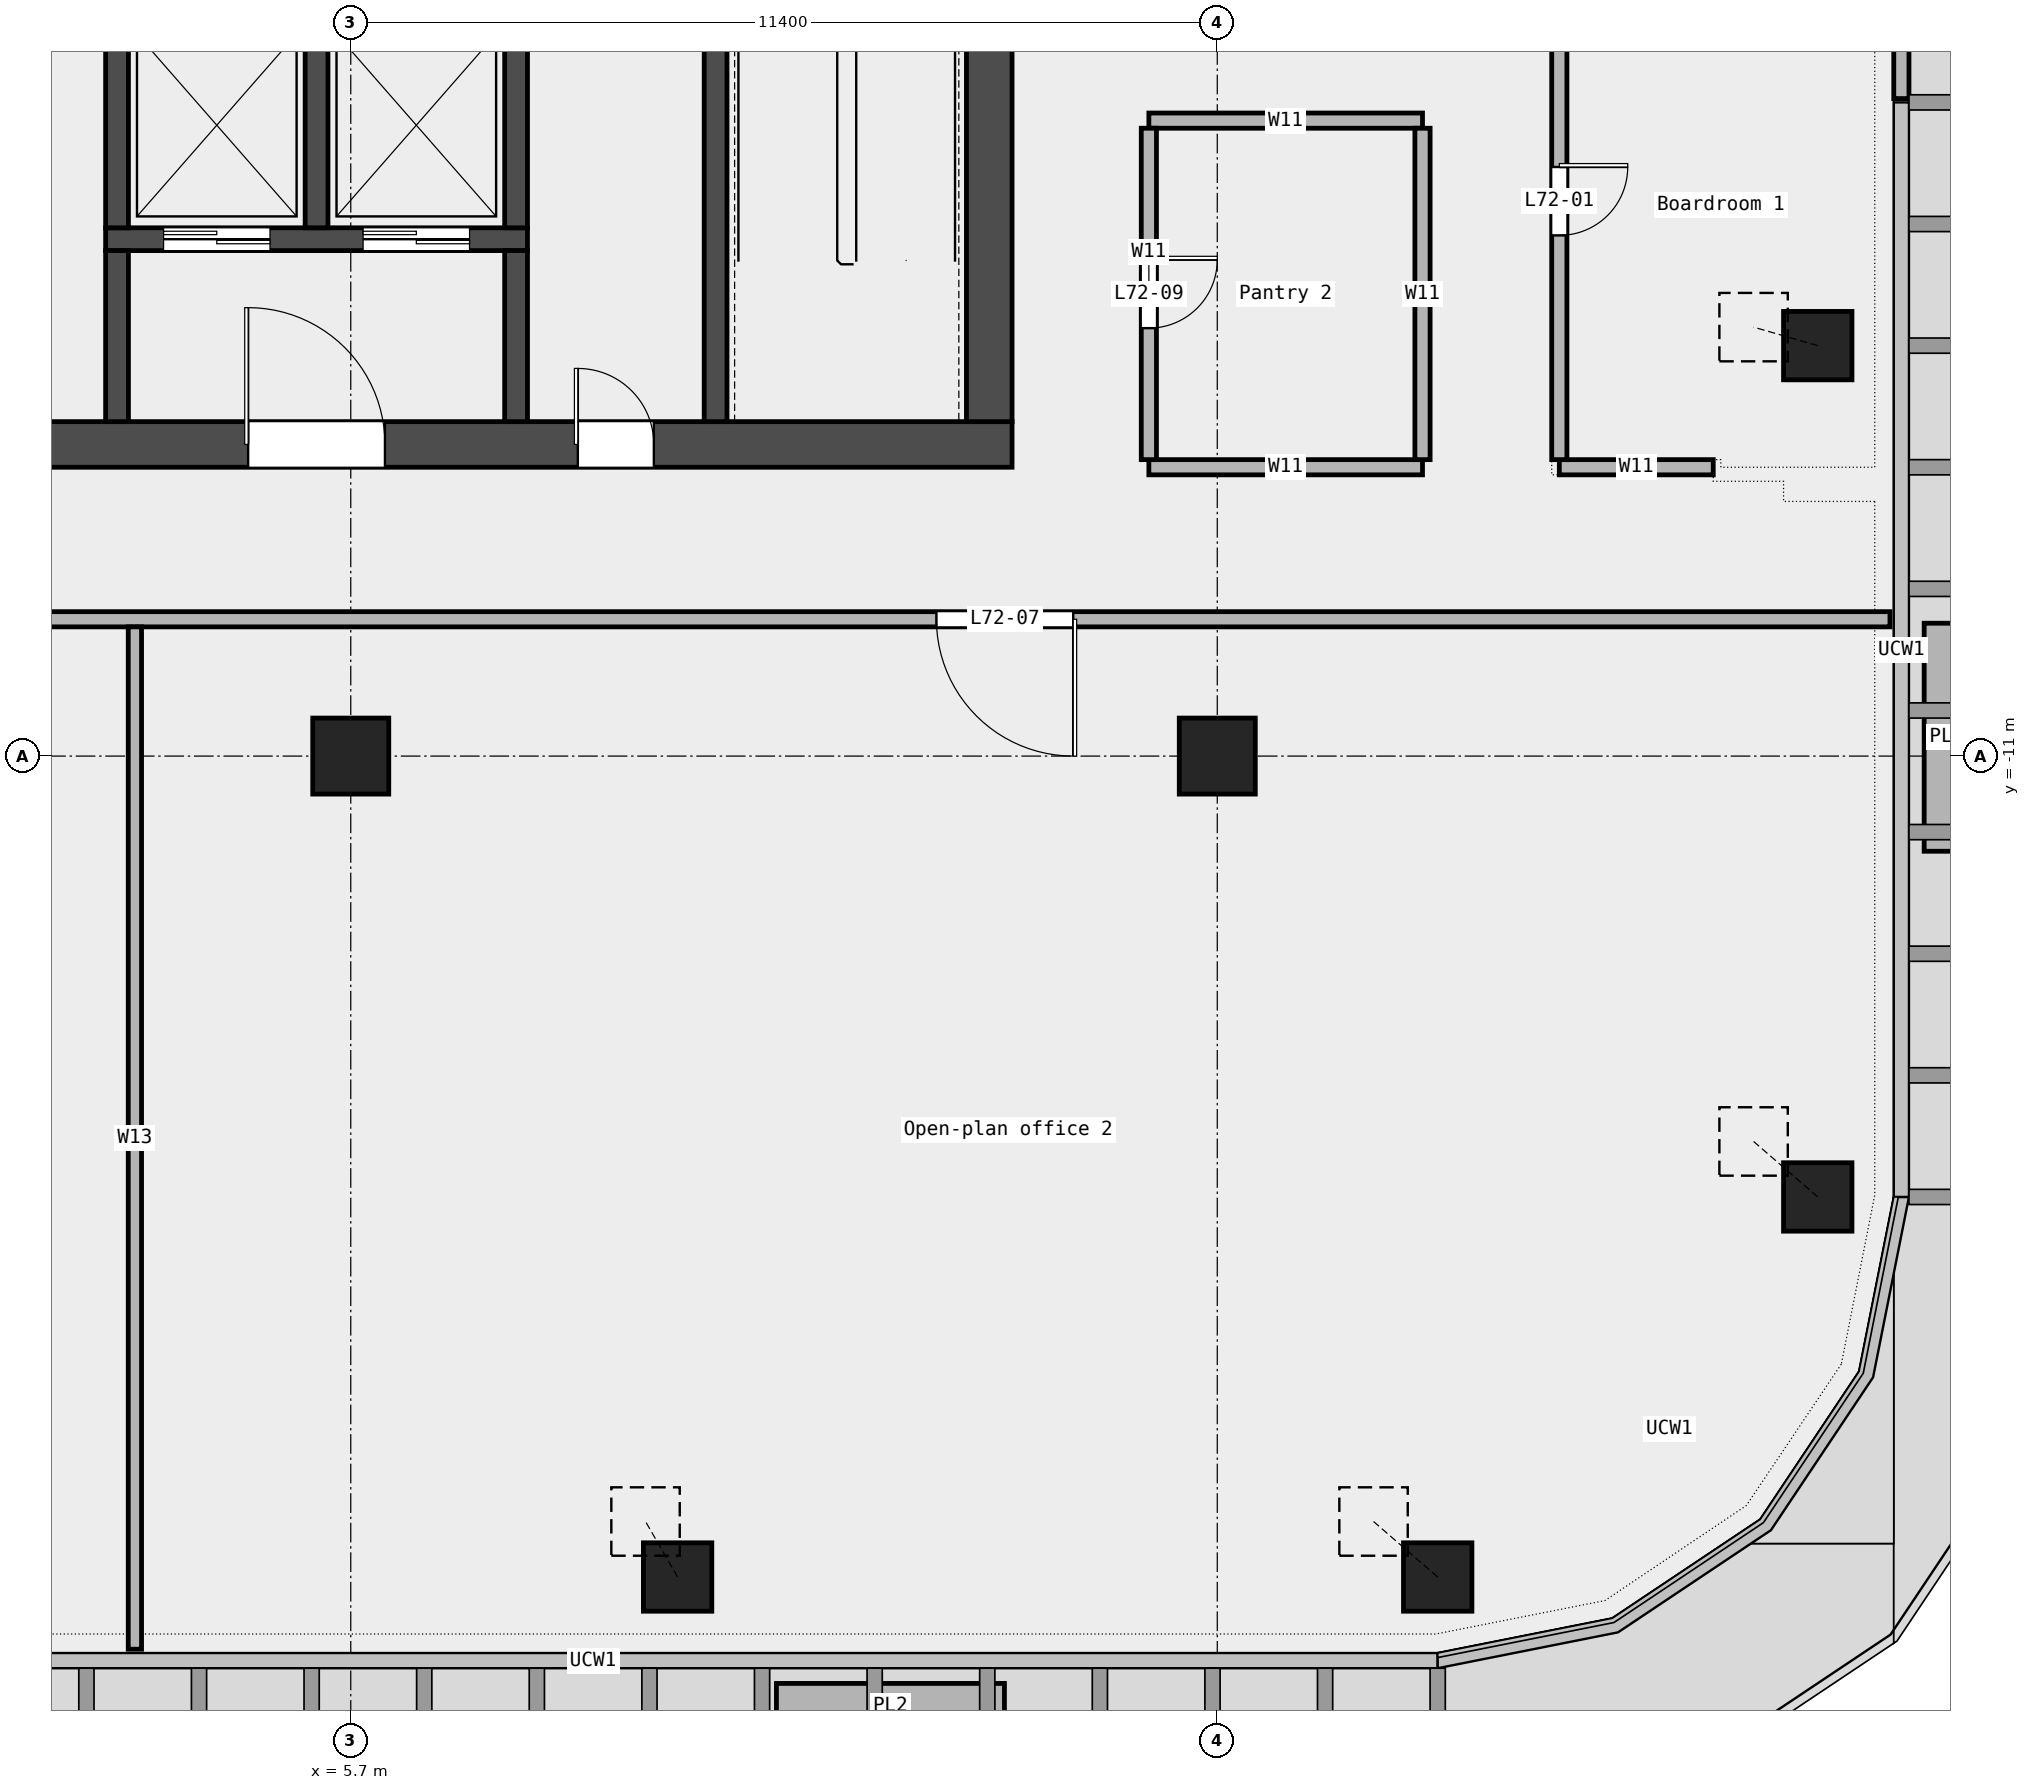
"""IFC4 building model, lengths in metres.
Left out: names, types, materials, properties, quantities, classifications, styles, units other than length and angle.
Written with IfcOpenShell. Run it as: python <this file> out.ifc"""

import sys

from ifc_helpers import new_model, si_unit, direction, frame, frame_2d, origin, origin_2d, place, context, subcontext, project, spatial, rectangle, extrude, element, fill, save


model = new_model("IFC4")
c1 = context("Model", 3, precision=1e-05, world=origin(), true_north=direction((0.0, 1.0)))
c2 = subcontext(c1, "Body", "Model", "MODEL_VIEW")
j1 = project(units=[si_unit("LENGTHUNIT", "METRE"), si_unit("PLANEANGLEUNIT", "RADIAN")], contexts=[c1])
p1 = place(None, origin())
s1 = spatial("IfcSite", under=j1, at=p1, CompositionType="ELEMENT")
p2 = place(p1, origin())
s2 = spatial("IfcBuilding", under=s1, at=p2, CompositionType="ELEMENT")
p3 = place(p2, frame((0.0, 0.0, 329.4)))
s3 = spatial("IfcBuildingStorey", under=s2, at=p3, CompositionType="ELEMENT", Elevation=329.4)
p4 = place(p3, frame((10.0, -21.8, 0.0), z_axis=(-0.112612491067, 0.194856104335, 0.974345690943), x_axis=(-0.8658093198, -0.500374081811, 0.0)))
e1 = element("IfcColumn", 1, at=p4, inside=s3, PredefinedType="COLUMN", context=c2, shape_type="SweptSolid", body=[
    extrude(rectangle(XDim=0.9, YDim=0.9, at=origin_2d()), origin(), (0.0, 0.0, 1.0), 3.746),
])
for number, where, z_axis, x_axis in (
    (2, (20.0, -21.8, 0.0), (-0.221, 0.191, 0.956), (-0.654, -0.756, 0.0)),
    (3, (25.0, -16.8, 0.0), (-0.221, 0.191, 0.956), (-0.654, -0.756, 0.0)),
):
    element("IfcColumn", number, at=place(p3, frame(where, z_axis=z_axis, x_axis=x_axis)), inside=s3, PredefinedType="COLUMN", context=c2, shape_type="SweptSolid", body=[
        extrude(rectangle(XDim=0.9, YDim=0.9, at=origin_2d()), origin(), (0.0, 0.0, 1.0), 3.817),
    ])
p5 = place(p3, frame((25.0, -5.6, 0.0), z_axis=(-0.224804338338, 0.064833649211, 0.972244623227), x_axis=(-0.277106372338, -0.960839246914, 0.0)))
e4 = element("IfcColumn", 4, at=p5, inside=s3, PredefinedType="COLUMN", context=c2, shape_type="SweptSolid", body=[
    extrude(rectangle(XDim=0.9, YDim=0.9, at=origin_2d()), origin(), (0.0, 0.0, 1.0), 3.754),
])
for number, where, z_axis, x_axis in (
    (5, (5.7, -11.0, 0.0), (0.0, 0.0, 1.0), (1.0, 0.0, 0.0)),
    (6, (17.1, -11.0, 0.0), (0.0, 0.0, 1.0), (1.0, 0.0, 0.0)),
):
    element("IfcColumn", number, at=place(p3, frame(where, z_axis=z_axis, x_axis=x_axis)), inside=s3, PredefinedType="COLUMN", context=c2, shape_type="SweptSolid", body=[
        extrude(rectangle(XDim=1.0, YDim=1.0, at=origin_2d()), origin(), (0.0, 0.0, 1.0), 3.65),
    ])
p6 = place(p3, frame((26.1, -2.35, 0.0), z_axis=(0.0, 0.0, 1.0), x_axis=(0.0, 1.0, 0.0)))
e7 = element("IfcWall", 7, at=p6, inside=s3, PredefinedType="STANDARD", context=c2, shape_type="SweptSolid", body=[
    extrude(rectangle(XDim=4.7, YDim=0.2, at=frame_2d((2.35, 0.0))), origin(), (0.0, 0.0, 1.0), 3.65),
])
p7 = place(p6, frame((2.3, 0.0, 0.0)))
e8 = element("IfcOpeningElement", 8, at=p7, cuts=e7, PredefinedType="OPENING", context=c2, shape_type="SweptSolid", body=[
    extrude(rectangle(XDim=1.8, YDim=2.4, at=frame_2d((0.9, 1.2))), frame((0.0, 0.112, 0.0), z_axis=(0.0, -1.0, 0.0), x_axis=(1.0, 0.0, 0.0)), (0.0, 0.0, 1.0), 0.224),
])
for number, where, z_axis, x_axis in (
    (9, (11.3, -23.5, 0.0), (0.0, 0.0, 1.0), (1.0, 0.0, 0.0)),
    (10, (26.7, -12.252, 0.0), (0.0, 0.0, 1.0), (0.0, 1.0, 0.0)),
):
    element("IfcWall", number, at=place(p3, frame(where, z_axis=z_axis, x_axis=x_axis)), inside=s3, PredefinedType="STANDARD", context=c2, shape_type="SweptSolid", body=[
        extrude(rectangle(XDim=3.0, YDim=0.6, at=frame_2d((1.5, 0.0))), origin(), (0.0, 0.0, 1.0), 0.7),
    ])
p8 = place(p3, frame((-25.95, -9.2, 0.0), z_axis=(0.0, 0.0, 1.0), x_axis=(1.0, 0.0, 0.0)))
e11 = element("IfcWall", 11, at=p8, inside=s3, PredefinedType="PARTITIONING", context=c2, shape_type="SweptSolid", body=[
    extrude(rectangle(XDim=51.9, YDim=0.2, at=frame_2d((25.95, 0.0))), origin(), (0.0, 0.0, 1.0), 3.65),
])
p9 = place(p8, frame((39.355, 0.0, 0.0)))
e12 = element("IfcOpeningElement", 12, at=p9, cuts=e11, PredefinedType="OPENING", context=c2, shape_type="SweptSolid", body=[
    extrude(rectangle(XDim=1.8, YDim=2.1, at=frame_2d((0.9, 1.05))), frame((0.0, 0.112, 0.0), z_axis=(0.0, -1.0, 0.0), x_axis=(1.0, 0.0, 0.0)), (0.0, 0.0, 1.0), 0.224),
])
p10 = place(p8, frame((5.173, 0.0, 0.0)))
e13 = element("IfcOpeningElement", 13, at=p10, cuts=e11, PredefinedType="OPENING", context=c2, shape_type="SweptSolid", body=[
    extrude(rectangle(XDim=1.5, YDim=2.1, at=frame_2d((0.75, 1.05))), frame((0.0, 0.112, 0.0), z_axis=(0.0, -1.0, 0.0), x_axis=(1.0, 0.0, 0.0)), (0.0, 0.0, 1.0), 0.224),
])
p11 = place(p8, frame((20.827, 0.0, 0.0)))
e14 = element("IfcOpeningElement", 14, at=p11, cuts=e11, PredefinedType="OPENING", context=c2, shape_type="SweptSolid", body=[
    extrude(rectangle(XDim=1.8, YDim=2.1, at=frame_2d((0.9, 1.05))), frame((0.0, 0.112, 0.0), z_axis=(0.0, -1.0, 0.0), x_axis=(1.0, 0.0, 0.0)), (0.0, 0.0, 1.0), 0.224),
])
p12 = place(p3, frame((16.2, -7.2, 0.0), z_axis=(0.0, 0.0, 1.0), x_axis=(1.0, 0.0, 0.0)))
e15 = element("IfcWall", 15, at=p12, inside=s3, PredefinedType="PARTITIONING", context=c2, shape_type="SweptSolid", body=[
    extrude(rectangle(XDim=3.6, YDim=0.2, at=frame_2d((1.8, 0.0))), origin(), (0.0, 0.0, 1.0), 3.65),
])
p13 = place(p3, frame((21.6, -7.2, 0.0), z_axis=(0.0, 0.0, 1.0), x_axis=(1.0, 0.0, 0.0)))
e16 = element("IfcWall", 16, at=p13, inside=s3, PredefinedType="PARTITIONING", context=c2, shape_type="SweptSolid", body=[
    extrude(rectangle(XDim=2.025, YDim=0.2, at=frame_2d((1.012, 0.0))), origin(), (0.0, 0.0, 1.0), 3.65),
])
p14 = place(p3, frame((16.2, -2.64, 0.0), z_axis=(0.0, 0.0, 1.0), x_axis=(1.0, 0.0, 0.0)))
e17 = element("IfcWall", 17, at=p14, inside=s3, PredefinedType="PARTITIONING", context=c2, shape_type="SweptSolid", body=[
    extrude(rectangle(XDim=3.6, YDim=0.2, at=frame_2d((1.8, 0.0))), origin(), (0.0, 0.0, 1.0), 3.65),
])
p15 = place(p3, frame((2.86, -22.75, 0.0), z_axis=(0.0, 0.0, 1.0), x_axis=(0.0, 1.0, 0.0)))
e18 = element("IfcWall", 18, at=p15, inside=s3, PredefinedType="PARTITIONING", context=c2, shape_type="SweptSolid", body=[
    extrude(rectangle(XDim=13.45, YDim=0.175, at=frame_2d((6.725, 0.0))), origin(), (0.0, 0.0, 1.0), 3.65),
])
p16 = place(p3, frame((16.2, -7.1, 0.0), z_axis=(0.0, 0.0, 1.0), x_axis=(0.0, 1.0, 0.0)))
e19 = element("IfcWall", 19, at=p16, inside=s3, PredefinedType="PARTITIONING", context=c2, shape_type="SweptSolid", body=[
    extrude(rectangle(XDim=4.36, YDim=0.2, at=frame_2d((2.18, 0.0))), origin(), (0.0, 0.0, 1.0), 3.65),
])
p17 = place(p16, frame((1.73, 0.0, 0.0)))
e20 = element("IfcOpeningElement", 20, at=p17, cuts=e19, PredefinedType="OPENING", context=c2, shape_type="SweptSolid", body=[
    extrude(rectangle(XDim=0.9, YDim=2.1, at=frame_2d((0.45, 1.05))), frame((0.0, 0.112, 0.0), z_axis=(0.0, -1.0, 0.0), x_axis=(1.0, 0.0, 0.0)), (0.0, 0.0, 1.0), 0.224),
])
p18 = place(p3, frame((19.8, -7.1, 0.0), z_axis=(0.0, 0.0, 1.0), x_axis=(0.0, 1.0, 0.0)))
e21 = element("IfcWall", 21, at=p18, inside=s3, PredefinedType="PARTITIONING", context=c2, shape_type="SweptSolid", body=[
    extrude(rectangle(XDim=4.36, YDim=0.2, at=frame_2d((2.18, 0.0))), origin(), (0.0, 0.0, 1.0), 3.65),
])
p19 = place(p3, frame((21.6, -7.1, 0.0), z_axis=(0.0, 0.0, 1.0), x_axis=(0.0, 1.0, 0.0)))
e22 = element("IfcWall", 22, at=p19, inside=s3, PredefinedType="PARTITIONING", context=c2, shape_type="SweptSolid", body=[
    extrude(rectangle(XDim=20.5, YDim=0.2, at=frame_2d((10.25, 0.0))), origin(), (0.0, 0.0, 1.0), 3.65),
])
p20 = place(p19, frame((2.95, 0.0, 0.0)))
e23 = element("IfcOpeningElement", 23, at=p20, cuts=e22, PredefinedType="OPENING", context=c2, shape_type="SweptSolid", body=[
    extrude(rectangle(XDim=0.9, YDim=2.1, at=frame_2d((0.45, 1.05))), frame((0.0, 0.112, 0.0), z_axis=(0.0, -1.0, 0.0), x_axis=(1.0, 0.0, 0.0)), (0.0, 0.0, 1.0), 0.224),
])
p21 = place(p19, frame((13.05, 0.0, 0.0)))
e24 = element("IfcOpeningElement", 24, at=p21, cuts=e22, PredefinedType="OPENING", context=c2, shape_type="SweptSolid", body=[
    extrude(rectangle(XDim=1.2, YDim=2.1, at=frame_2d((0.6, 1.05))), frame((0.0, 0.112, 0.0), z_axis=(0.0, -1.0, 0.0), x_axis=(1.0, 0.0, 0.0)), (0.0, 0.0, 1.0), 0.224),
])
p22 = place(p3, frame((-14.4, -6.9, 0.0), z_axis=(0.0, 0.0, 1.0), x_axis=(1.0, 0.0, 0.0)))
e25 = element("IfcWall", 25, at=p22, inside=s3, PredefinedType="SHEAR", context=c2, shape_type="SweptSolid", body=[
    extrude(rectangle(XDim=28.8, YDim=0.6, at=frame_2d((14.4, 0.0))), origin(), (0.0, 0.0, 1.0), 3.7),
])
p23 = place(p22, frame((4.712, 0.0, 0.0)))
e26 = element("IfcOpeningElement", 26, at=p23, cuts=e25, PredefinedType="OPENING", context=c2, shape_type="SweptSolid", body=[
    extrude(rectangle(XDim=1.0, YDim=2.1, at=frame_2d((0.5, 1.05))), frame((0.0, 0.312, 0.0), z_axis=(0.0, -1.0, 0.0), x_axis=(1.0, 0.0, 0.0)), (0.0, 0.0, 1.0), 0.624),
])
p24 = place(p22, frame((9.675, 0.0, 0.0)))
e27 = element("IfcOpeningElement", 27, at=p24, cuts=e25, PredefinedType="OPENING", context=c2, shape_type="SweptSolid", body=[
    extrude(rectangle(XDim=1.2, YDim=2.1, at=frame_2d((0.6, 1.05))), frame((0.0, 0.312, 0.0), z_axis=(0.0, -1.0, 0.0), x_axis=(1.0, 0.0, 0.0)), (0.0, 0.0, 1.0), 0.624),
])
p25 = place(p22, frame((15.025, 0.0, 0.0)))
e28 = element("IfcOpeningElement", 28, at=p25, cuts=e25, PredefinedType="OPENING", context=c2, shape_type="SweptSolid", body=[
    extrude(rectangle(XDim=1.0, YDim=2.1, at=frame_2d((0.5, 1.05))), frame((0.0, 0.312, 0.0), z_axis=(0.0, -1.0, 0.0), x_axis=(1.0, 0.0, 0.0)), (0.0, 0.0, 1.0), 0.624),
])
p26 = place(p22, frame((18.75, 0.0, 0.0)))
e29 = element("IfcOpeningElement", 29, at=p26, cuts=e25, PredefinedType="OPENING", context=c2, shape_type="SweptSolid", body=[
    extrude(rectangle(XDim=1.8, YDim=2.1, at=frame_2d((0.9, 1.05))), frame((0.0, 0.312, 0.0), z_axis=(0.0, -1.0, 0.0), x_axis=(1.0, 0.0, 0.0)), (0.0, 0.0, 1.0), 0.624),
])
p27 = place(p22, frame((23.087, 0.0, 0.0)))
e30 = element("IfcOpeningElement", 30, at=p27, cuts=e25, PredefinedType="OPENING", context=c2, shape_type="SweptSolid", body=[
    extrude(rectangle(XDim=1.0, YDim=2.1, at=frame_2d((0.5, 1.05))), frame((0.0, 0.312, 0.0), z_axis=(0.0, -1.0, 0.0), x_axis=(1.0, 0.0, 0.0)), (0.0, 0.0, 1.0), 0.624),
])
p28 = place(p3, frame((14.1, -6.6, 0.0), z_axis=(0.0, 0.0, 1.0), x_axis=(0.0, 1.0, 0.0)))
e31 = element("IfcWall", 31, at=p28, inside=s3, PredefinedType="SHEAR", context=c2, shape_type="SweptSolid", body=[
    extrude(rectangle(XDim=19.5, YDim=0.6, at=frame_2d((9.75, 0.0))), origin(), (0.0, 0.0, 1.0), 3.7),
])
p29 = place(p28, frame((9.3, 0.0, 0.0)))
e32 = element("IfcOpeningElement", 32, at=p29, cuts=e31, PredefinedType="OPENING", context=c2, shape_type="SweptSolid", body=[
    extrude(rectangle(XDim=1.8, YDim=2.1, at=frame_2d((0.9, 1.05))), frame((0.0, 0.312, 0.0), z_axis=(0.0, -1.0, 0.0), x_axis=(1.0, 0.0, 0.0)), (0.0, 0.0, 1.0), 0.624),
])
p30 = place(p3, frame((10.5, -6.6, 0.0), z_axis=(0.0, 0.0, 1.0), x_axis=(0.0, 1.0, 0.0)))
e33 = element("IfcWall", 33, at=p30, inside=s3, PredefinedType="SHEAR", context=c2, shape_type="SweptSolid", body=[
    extrude(rectangle(XDim=8.55, YDim=0.3, at=frame_2d((4.275, 0.0))), origin(), (0.0, 0.0, 1.0), 3.7),
])
p31 = place(p3, frame((2.475, -4.2, 0.0), z_axis=(0.0, 0.0, 1.0), x_axis=(1.0, 0.0, 0.0)))
e34 = element("IfcWall", 34, at=p31, inside=s3, PredefinedType="SOLIDWALL", context=c2, shape_type="SweptSolid", body=[
    extrude(rectangle(XDim=5.55, YDim=0.3, at=frame_2d((2.775, 0.0))), origin(), (0.0, 0.0, 1.0), 3.7),
])
p32 = place(p31, frame((0.762, 0.0, 0.0)))
e35 = element("IfcOpeningElement", 35, at=p32, cuts=e34, PredefinedType="OPENING", context=c2, shape_type="SweptSolid", body=[
    extrude(rectangle(XDim=1.4, YDim=2.1, at=frame_2d((0.7, 1.05))), frame((0.0, 0.162, 0.0), z_axis=(0.0, -1.0, 0.0), x_axis=(1.0, 0.0, 0.0)), (0.0, 0.0, 1.0), 0.324),
])
p33 = place(p31, frame((3.387, 0.0, 0.0)))
e36 = element("IfcOpeningElement", 36, at=p33, cuts=e34, PredefinedType="OPENING", context=c2, shape_type="SweptSolid", body=[
    extrude(rectangle(XDim=1.4, YDim=2.1, at=frame_2d((0.7, 1.05))), frame((0.0, 0.162, 0.0), z_axis=(0.0, -1.0, 0.0), x_axis=(1.0, 0.0, 0.0)), (0.0, 0.0, 1.0), 0.324),
])
p34 = place(p3, frame((2.625, -4.05, 0.0), z_axis=(0.0, 0.0, 1.0), x_axis=(0.0, 1.0, 0.0)))
e37 = element("IfcWall", 37, at=p34, inside=s3, PredefinedType="SOLIDWALL", context=c2, shape_type="SweptSolid", body=[
    extrude(rectangle(XDim=2.7, YDim=0.3, at=frame_2d((1.35, 0.0))), origin(), (0.0, 0.0, 1.0), 3.7),
])
p35 = place(p3, frame((2.625, -6.6, 0.0), z_axis=(0.0, 0.0, 1.0), x_axis=(0.0, 1.0, 0.0)))
e38 = element("IfcWall", 38, at=p35, inside=s3, PredefinedType="SOLIDWALL", context=c2, shape_type="SweptSolid", body=[
    extrude(rectangle(XDim=2.25, YDim=0.3, at=frame_2d((1.125, 0.0))), origin(), (0.0, 0.0, 1.0), 3.7),
])
for number, where, z_axis, x_axis in (
    (39, (5.25, -4.05, 0.0), (0.0, 0.0, 1.0), (0.0, 1.0, 0.0)),
    (40, (7.875, -4.05, 0.0), (0.0, 0.0, 1.0), (0.0, 1.0, 0.0)),
):
    element("IfcWall", number, at=place(p3, frame(where, z_axis=z_axis, x_axis=x_axis)), inside=s3, PredefinedType="SOLIDWALL", context=c2, shape_type="SweptSolid", body=[
        extrude(rectangle(XDim=2.7, YDim=0.3, at=frame_2d((1.35, 0.0))), origin(), (0.0, 0.0, 1.0), 3.7),
    ])
p36 = place(p3, frame((7.875, -6.6, 0.0), z_axis=(0.0, 0.0, 1.0), x_axis=(0.0, 1.0, 0.0)))
e41 = element("IfcWall", 41, at=p36, inside=s3, PredefinedType="SOLIDWALL", context=c2, shape_type="SweptSolid", body=[
    extrude(rectangle(XDim=2.25, YDim=0.3, at=frame_2d((1.125, 0.0))), origin(), (0.0, 0.0, 1.0), 3.7),
])
p37 = place(p20, origin())
e42 = element("IfcDoor", 42, at=p37, inside=s3, OperationType="SINGLE_SWING_LEFT", PredefinedType="DOOR", context=c2, shape_type="SweptSolid", body=[
    extrude(rectangle(XDim=0.9, YDim=2.1, at=frame_2d((0.45, 1.05))), frame((0.0, 0.025, 0.0), z_axis=(0.0, -1.0, 0.0), x_axis=(1.0, 0.0, 0.0)), (0.0, 0.0, 1.0), 0.05),
])
fill(e23, e42)
p38 = place(p9, origin())
e43 = element("IfcDoor", 43, at=p38, inside=s3, OperationType="DOUBLE_DOOR_SINGLE_SWING", PredefinedType="DOOR", context=c2, shape_type="SweptSolid", body=[
    extrude(rectangle(XDim=1.8, YDim=2.1, at=frame_2d((0.9, 1.05))), frame((0.0, 0.025, 0.0), z_axis=(0.0, -1.0, 0.0), x_axis=(1.0, 0.0, 0.0)), (0.0, 0.0, 1.0), 0.05),
])
fill(e12, e43)
p39 = place(p17, origin())
e44 = element("IfcDoor", 44, at=p39, inside=s3, OperationType="SINGLE_SWING_LEFT", PredefinedType="DOOR", context=c2, shape_type="SweptSolid", body=[
    extrude(rectangle(XDim=0.9, YDim=2.1, at=frame_2d((0.45, 1.05))), frame((0.0, 0.025, 0.0), z_axis=(0.0, -1.0, 0.0), x_axis=(1.0, 0.0, 0.0)), (0.0, 0.0, 1.0), 0.05),
])
fill(e20, e44)
p40 = place(p32, origin())
e45 = element("IfcDoor", 45, at=p40, inside=s3, OperationType="DOUBLE_DOOR_SLIDING", PredefinedType="DOOR", context=c2, shape_type="SweptSolid", body=[
    extrude(rectangle(XDim=1.4, YDim=2.1, at=frame_2d((0.7, 1.05))), frame((0.0, 0.025, 0.0), z_axis=(0.0, -1.0, 0.0), x_axis=(1.0, 0.0, 0.0)), (0.0, 0.0, 1.0), 0.05),
])
fill(e35, e45)
p41 = place(p33, origin())
e46 = element("IfcDoor", 46, at=p41, inside=s3, OperationType="DOUBLE_DOOR_SLIDING", PredefinedType="DOOR", context=c2, shape_type="SweptSolid", body=[
    extrude(rectangle(XDim=1.4, YDim=2.1, at=frame_2d((0.7, 1.05))), frame((0.0, 0.025, 0.0), z_axis=(0.0, -1.0, 0.0), x_axis=(1.0, 0.0, 0.0)), (0.0, 0.0, 1.0), 0.05),
])
fill(e36, e46)
p42 = place(p26, origin())
e47 = element("IfcDoor", 47, at=p42, inside=s3, OperationType="DOUBLE_DOOR_SINGLE_SWING", PredefinedType="DOOR", context=c2, shape_type="SweptSolid", body=[
    extrude(rectangle(XDim=1.8, YDim=2.1, at=frame_2d((0.9, 1.05))), frame((0.0, 0.025, 0.0), z_axis=(0.0, -1.0, 0.0), x_axis=(1.0, 0.0, 0.0)), (0.0, 0.0, 1.0), 0.05),
])
fill(e29, e47)
p43 = place(p27, origin())
e48 = element("IfcDoor", 48, at=p43, inside=s3, OperationType="SINGLE_SWING_LEFT", PredefinedType="DOOR", context=c2, shape_type="SweptSolid", body=[
    extrude(rectangle(XDim=1.0, YDim=2.1, at=frame_2d((0.5, 1.05))), frame((0.0, 0.025, 0.0), z_axis=(0.0, -1.0, 0.0), x_axis=(1.0, 0.0, 0.0)), (0.0, 0.0, 1.0), 0.05),
])
fill(e30, e48)
save(model, sys.argv[1])
